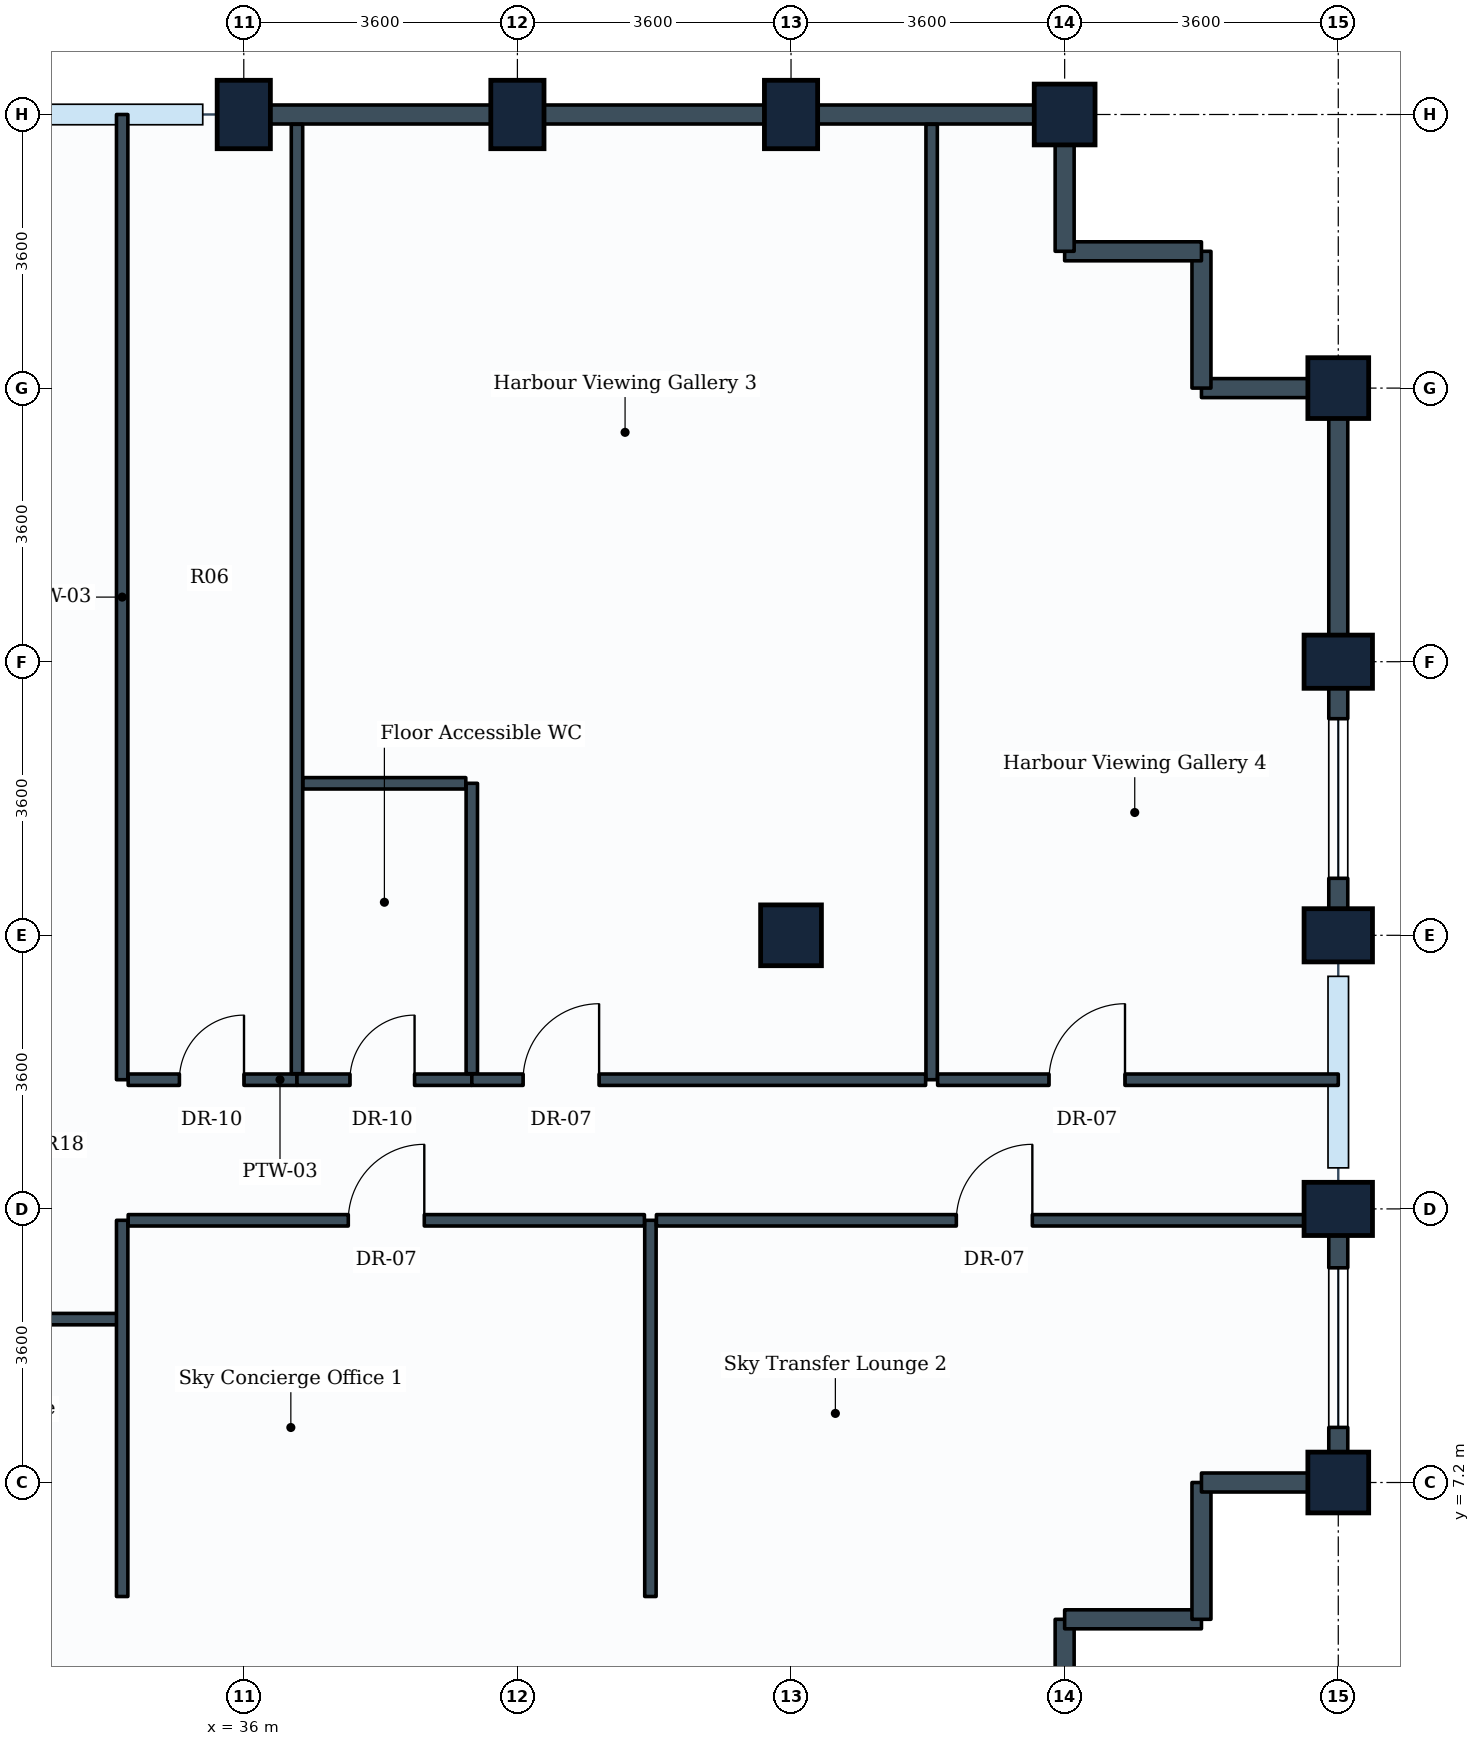
"""IFC4 building model, lengths in metres.
Left out: names, types, materials, properties, quantities, classifications, styles, units other than length and angle.
Written with IfcOpenShell. Run it as: python <this file> out.ifc"""

import sys

from ifc_helpers import new_model, si_unit, direction, frame, frame_2d, origin, origin_2d, place, context, subcontext, project, spatial, rectangle, extrude, element, fill, save


model = new_model("IFC4")
c1 = context("Model", 3, precision=1e-05, world=origin(), true_north=direction((0.0, 1.0)))
c2 = subcontext(c1, "Body", "Model", "MODEL_VIEW")
j1 = project(units=[si_unit("LENGTHUNIT", "METRE"), si_unit("PLANEANGLEUNIT", "RADIAN")], contexts=[c1])
p1 = place(None, origin())
s1 = spatial("IfcSite", under=j1, at=p1, CompositionType="ELEMENT")
p2 = place(p1, origin())
s2 = spatial("IfcBuilding", under=s1, at=p2, CompositionType="ELEMENT")
p3 = place(p2, frame((0.0, 0.0, 209.0)))
s3 = spatial("IfcBuildingStorey", under=s2, at=p3, CompositionType="ELEMENT", Elevation=209.0)
for number, where, z_axis, x_axis in (
    (1, (36.0, 25.2, 0.0), (0.0, 0.0, 1.0), (1.0, 0.0, 0.0)),
    (2, (39.6, 25.2, 0.0), (0.0, 0.0, 1.0), (1.0, 0.0, 0.0)),
):
    element("IfcColumn", number, at=place(p3, frame(where, z_axis=z_axis, x_axis=x_axis)), inside=s3, PredefinedType="COLUMN", context=c2, shape_type="SweptSolid", body=[
        extrude(rectangle(XDim=0.7, YDim=0.9, at=origin_2d()), origin(), (0.0, 0.0, 1.0), 4.8),
    ])
p4 = place(p3, frame((43.2, 14.4, 0.0), z_axis=(0.0, 0.0, 1.0), x_axis=(1.0, 0.0, 0.0)))
e3 = element("IfcColumn", 3, at=p4, inside=s3, PredefinedType="COLUMN", context=c2, shape_type="SweptSolid", body=[
    extrude(rectangle(XDim=0.8, YDim=0.8, at=origin_2d()), origin(), (0.0, 0.0, 1.0), 4.8),
])
p5 = place(p3, frame((43.2, 25.2, 0.0), z_axis=(0.0, 0.0, 1.0), x_axis=(1.0, 0.0, 0.0)))
e4 = element("IfcColumn", 4, at=p5, inside=s3, PredefinedType="COLUMN", context=c2, shape_type="SweptSolid", body=[
    extrude(rectangle(XDim=0.7, YDim=0.9, at=origin_2d()), origin(), (0.0, 0.0, 1.0), 4.8),
])
for number, where, z_axis, x_axis in (
    (5, (46.8, 25.2, 0.0), (0.0, 0.0, 1.0), (1.0, 0.0, 0.0)),
    (6, (50.4, 7.2, 0.0), (0.0, 0.0, 1.0), (1.0, 0.0, 0.0)),
):
    element("IfcColumn", number, at=place(p3, frame(where, z_axis=z_axis, x_axis=x_axis)), inside=s3, PredefinedType="COLUMN", context=c2, shape_type="SweptSolid", body=[
        extrude(rectangle(XDim=0.8, YDim=0.8, at=origin_2d()), origin(), (0.0, 0.0, 1.0), 4.8),
    ])
for number, where, z_axis, x_axis in (
    (7, (50.4, 10.8, 0.0), (0.0, 0.0, 1.0), (0.0, 1.0, 0.0)),
    (8, (50.4, 14.4, 0.0), (0.0, 0.0, 1.0), (0.0, 1.0, 0.0)),
    (9, (50.4, 18.0, 0.0), (0.0, 0.0, 1.0), (0.0, 1.0, 0.0)),
):
    element("IfcColumn", number, at=place(p3, frame(where, z_axis=z_axis, x_axis=x_axis)), inside=s3, PredefinedType="COLUMN", context=c2, shape_type="SweptSolid", body=[
        extrude(rectangle(XDim=0.7, YDim=0.9, at=origin_2d()), origin(), (0.0, 0.0, 1.0), 4.8),
    ])
p6 = place(p3, frame((50.4, 21.6, 0.0), z_axis=(0.0, 0.0, 1.0), x_axis=(0.0, 1.0, 0.0)))
e10 = element("IfcColumn", 10, at=p6, inside=s3, PredefinedType="COLUMN", context=c2, shape_type="SweptSolid", body=[
    extrude(rectangle(XDim=0.8, YDim=0.8, at=origin_2d()), origin(), (0.0, 0.0, 1.0), 4.8),
])
p7 = place(p3, frame((46.8, 5.4, 0.0), z_axis=(0.0, 0.0, 1.0), x_axis=(0.0, -1.0, 0.0)))
e11 = element("IfcWall", 11, at=p7, inside=s3, PredefinedType="STANDARD", context=c2, shape_type="SweptSolid", body=[
    extrude(rectangle(XDim=1.8, YDim=0.25, at=frame_2d((0.9, 0.0))), origin(), (0.0, 0.0, 1.0), 3.93),
])
for number, where, z_axis, x_axis in (
    (12, (48.6, 5.4, 0.0), (0.0, 0.0, 1.0), (-1.0, 0.0, 0.0)),
    (13, (48.6, 7.2, 0.0), (0.0, 0.0, 1.0), (0.0, -1.0, 0.0)),
):
    element("IfcWall", number, at=place(p3, frame(where, z_axis=z_axis, x_axis=x_axis)), inside=s3, PredefinedType="STANDARD", context=c2, shape_type="SweptSolid", body=[
        extrude(rectangle(XDim=1.8, YDim=0.25, at=frame_2d((0.9, 0.0))), origin(), (0.0, 0.0, 1.0), 4.535),
    ])
p8 = place(p3, frame((50.4, 7.2, 0.0), z_axis=(0.0, 0.0, 1.0), x_axis=(-1.0, 0.0, 0.0)))
e14 = element("IfcWall", 14, at=p8, inside=s3, PredefinedType="STANDARD", context=c2, shape_type="SweptSolid", body=[
    extrude(rectangle(XDim=1.8, YDim=0.25, at=frame_2d((0.9, 0.0))), origin(), (0.0, 0.0, 1.0), 3.93),
])
p9 = place(p3, frame((50.4, 10.8, 0.0), z_axis=(0.0, 0.0, 1.0), x_axis=(0.0, -1.0, 0.0)))
e15 = element("IfcWall", 15, at=p9, inside=s3, PredefinedType="STANDARD", context=c2, shape_type="SweptSolid", body=[
    extrude(rectangle(XDim=3.6, YDim=0.25, at=frame_2d((1.8, 0.0))), origin(), (0.0, 0.0, 1.0), 3.93),
])
p10 = place(p9, frame((0.775, 0.0, 0.85)))
e16 = element("IfcOpeningElement", 16, at=p10, cuts=e15, PredefinedType="OPENING", context=c2, shape_type="SweptSolid", body=[
    extrude(rectangle(XDim=2.1, YDim=1.35, at=frame_2d((1.05, 0.675))), frame((0.0, 0.135, 0.0), z_axis=(0.0, -1.0, 0.0), x_axis=(1.0, 0.0, 0.0)), (0.0, 0.0, 1.0), 0.27),
])
p11 = place(p3, frame((50.4, 18.0, 0.0), z_axis=(0.0, 0.0, 1.0), x_axis=(0.0, -1.0, 0.0)))
e17 = element("IfcWall", 17, at=p11, inside=s3, PredefinedType="STANDARD", context=c2, shape_type="SweptSolid", body=[
    extrude(rectangle(XDim=3.6, YDim=0.25, at=frame_2d((1.8, 0.0))), origin(), (0.0, 0.0, 1.0), 3.93),
])
p12 = place(p11, frame((0.75, 0.0, 0.85)))
e18 = element("IfcOpeningElement", 18, at=p12, cuts=e17, PredefinedType="OPENING", context=c2, shape_type="SweptSolid", body=[
    extrude(rectangle(XDim=2.1, YDim=1.35, at=frame_2d((1.05, 0.675))), frame((0.0, 0.135, 0.0), z_axis=(0.0, -1.0, 0.0), x_axis=(1.0, 0.0, 0.0)), (0.0, 0.0, 1.0), 0.27),
])
p13 = place(p3, frame((50.4, 21.6, 0.0), z_axis=(0.0, 0.0, 1.0), x_axis=(0.0, -1.0, 0.0)))
e19 = element("IfcWall", 19, at=p13, inside=s3, PredefinedType="STANDARD", context=c2, shape_type="SweptSolid", body=[
    extrude(rectangle(XDim=3.6, YDim=0.25, at=frame_2d((1.8, 0.0))), origin(), (0.0, 0.0, 1.0), 3.93),
])
p14 = place(p3, frame((48.6, 21.6, 0.0), z_axis=(0.0, 0.0, 1.0), x_axis=(1.0, 0.0, 0.0)))
e20 = element("IfcWall", 20, at=p14, inside=s3, PredefinedType="STANDARD", context=c2, shape_type="SweptSolid", body=[
    extrude(rectangle(XDim=1.8, YDim=0.25, at=frame_2d((0.9, 0.0))), origin(), (0.0, 0.0, 1.0), 3.93),
])
p15 = place(p3, frame((48.6, 23.4, 0.0), z_axis=(0.0, 0.0, 1.0), x_axis=(0.0, -1.0, 0.0)))
e21 = element("IfcWall", 21, at=p15, inside=s3, PredefinedType="STANDARD", context=c2, shape_type="SweptSolid", body=[
    extrude(rectangle(XDim=1.8, YDim=0.25, at=frame_2d((0.9, 0.0))), origin(), (0.0, 0.0, 1.0), 4.535),
])
p16 = place(p3, frame((46.8, 23.4, 0.0), z_axis=(0.0, 0.0, 1.0), x_axis=(1.0, 0.0, 0.0)))
e22 = element("IfcWall", 22, at=p16, inside=s3, PredefinedType="STANDARD", context=c2, shape_type="SweptSolid", body=[
    extrude(rectangle(XDim=1.8, YDim=0.25, at=frame_2d((0.9, 0.0))), origin(), (0.0, 0.0, 1.0), 4.535),
])
p17 = place(p3, frame((46.8, 25.2, 0.0), z_axis=(0.0, 0.0, 1.0), x_axis=(0.0, -1.0, 0.0)))
e23 = element("IfcWall", 23, at=p17, inside=s3, PredefinedType="STANDARD", context=c2, shape_type="SweptSolid", body=[
    extrude(rectangle(XDim=1.8, YDim=0.25, at=frame_2d((0.9, 0.0))), origin(), (0.0, 0.0, 1.0), 3.93),
])
p18 = place(p3, frame((43.2, 25.2, 0.0), z_axis=(0.0, 0.0, 1.0), x_axis=(1.0, 0.0, 0.0)))
e24 = element("IfcWall", 24, at=p18, inside=s3, PredefinedType="STANDARD", context=c2, shape_type="SweptSolid", body=[
    extrude(rectangle(XDim=3.6, YDim=0.25, at=frame_2d((1.8, 0.0))), origin(), (0.0, 0.0, 1.0), 3.93),
])
p19 = place(p3, frame((39.6, 25.2, 0.0), z_axis=(0.0, 0.0, 1.0), x_axis=(1.0, 0.0, 0.0)))
e25 = element("IfcWall", 25, at=p19, inside=s3, PredefinedType="STANDARD", context=c2, shape_type="SweptSolid", body=[
    extrude(rectangle(XDim=3.6, YDim=0.25, at=frame_2d((1.8, 0.0))), origin(), (0.0, 0.0, 1.0), 3.93),
])
p20 = place(p3, frame((36.0, 25.2, 0.0), z_axis=(0.0, 0.0, 1.0), x_axis=(1.0, 0.0, 0.0)))
e26 = element("IfcWall", 26, at=p20, inside=s3, PredefinedType="STANDARD", context=c2, shape_type="SweptSolid", body=[
    extrude(rectangle(XDim=3.6, YDim=0.25, at=frame_2d((1.8, 0.0))), origin(), (0.0, 0.0, 1.0), 3.93),
])
p21 = place(p3, frame((34.4, 12.5, 0.0), z_axis=(0.0, 0.0, 1.0), x_axis=(0.0, 1.0, 0.0)))
e27 = element("IfcWall", 27, at=p21, inside=s3, PredefinedType="PARTITIONING", context=c2, shape_type="SweptSolid", body=[
    extrude(rectangle(XDim=12.7, YDim=0.15, at=frame_2d((6.35, 0.0))), origin(), (0.0, 0.0, 1.0), 3.93),
])
p22 = place(p3, frame((34.479, 12.5, 0.0), z_axis=(0.0, 0.0, 1.0), x_axis=(1.0, 0.0, 0.0)))
e28 = element("IfcWall", 28, at=p22, inside=s3, PredefinedType="PARTITIONING", context=c2, shape_type="SweptSolid", body=[
    extrude(rectangle(XDim=2.221, YDim=0.15, at=frame_2d((1.11, 0.0))), origin(), (0.0, 0.0, 1.0), 4.26),
])
p23 = place(p22, frame((0.674, 0.0, 0.0)))
e29 = element("IfcOpeningElement", 29, at=p23, cuts=e28, PredefinedType="OPENING", context=c2, shape_type="SweptSolid", body=[
    extrude(rectangle(XDim=0.85, YDim=2.1, at=frame_2d((0.425, 1.05))), frame((0.0, 0.085, 0.0), z_axis=(0.0, -1.0, 0.0), x_axis=(1.0, 0.0, 0.0)), (0.0, 0.0, 1.0), 0.17),
])
p24 = place(p3, frame((36.7, 12.579, 0.0), z_axis=(0.0, 0.0, 1.0), x_axis=(0.0, 1.0, 0.0)))
e30 = element("IfcWall", 30, at=p24, inside=s3, PredefinedType="PARTITIONING", context=c2, shape_type="SweptSolid", body=[
    extrude(rectangle(XDim=12.492, YDim=0.15, at=frame_2d((6.246, 0.0))), origin(), (0.0, 0.0, 1.0), 3.93),
])
p25 = place(p3, frame((36.7, 12.5, 0.0), z_axis=(0.0, 0.0, 1.0), x_axis=(1.0, 0.0, 0.0)))
e31 = element("IfcWall", 31, at=p25, inside=s3, PredefinedType="PARTITIONING", context=c2, shape_type="SweptSolid", body=[
    extrude(rectangle(XDim=2.3, YDim=0.15, at=frame_2d((1.15, 0.0))), origin(), (0.0, 0.0, 1.0), 4.535),
])
p26 = place(p25, frame((0.697, 0.0, 0.0)))
e32 = element("IfcOpeningElement", 32, at=p26, cuts=e31, PredefinedType="OPENING", context=c2, shape_type="SweptSolid", body=[
    extrude(rectangle(XDim=0.85, YDim=2.1, at=frame_2d((0.425, 1.05))), frame((0.0, 0.085, 0.0), z_axis=(0.0, -1.0, 0.0), x_axis=(1.0, 0.0, 0.0)), (0.0, 0.0, 1.0), 0.17),
])
p27 = place(p3, frame((39.0, 12.579, 0.0), z_axis=(0.0, 0.0, 1.0), x_axis=(0.0, 1.0, 0.0)))
e33 = element("IfcWall", 33, at=p27, inside=s3, PredefinedType="PARTITIONING", context=c2, shape_type="SweptSolid", body=[
    extrude(rectangle(XDim=3.821, YDim=0.15, at=frame_2d((1.91, 0.0))), origin(), (0.0, 0.0, 1.0), 4.23),
])
p28 = place(p3, frame((36.779, 16.4, 0.0), z_axis=(0.0, 0.0, 1.0), x_axis=(1.0, 0.0, 0.0)))
e34 = element("IfcWall", 34, at=p28, inside=s3, PredefinedType="PARTITIONING", context=c2, shape_type="SweptSolid", body=[
    extrude(rectangle(XDim=2.142, YDim=0.15, at=frame_2d((1.071, 0.0))), origin(), (0.0, 0.0, 1.0), 4.535),
])
p29 = place(p3, frame((28.879, 9.35, 0.0), z_axis=(0.0, 0.0, 1.0), x_axis=(1.0, 0.0, 0.0)))
e35 = element("IfcWall", 35, at=p29, inside=s3, PredefinedType="PARTITIONING", context=c2, shape_type="SweptSolid", body=[
    extrude(rectangle(XDim=5.521, YDim=0.15, at=frame_2d((2.76, 0.0))), origin(), (0.0, 0.0, 1.0), 4.535),
])
p30 = place(p29, frame((0.36, 0.0, 0.0)))
e36 = element("IfcOpeningElement", 36, at=p30, cuts=e35, PredefinedType="OPENING", context=c2, shape_type="SweptSolid", body=[
    extrude(rectangle(XDim=1.0, YDim=2.1, at=frame_2d((0.5, 1.05))), frame((0.0, 0.085, 0.0), z_axis=(0.0, -1.0, 0.0), x_axis=(1.0, 0.0, 0.0)), (0.0, 0.0, 1.0), 0.17),
])
p31 = place(p3, frame((34.4, 5.7, 0.0), z_axis=(0.0, 0.0, 1.0), x_axis=(0.0, 1.0, 0.0)))
e37 = element("IfcWall", 37, at=p31, inside=s3, PredefinedType="PARTITIONING", context=c2, shape_type="SweptSolid", body=[
    extrude(rectangle(XDim=4.95, YDim=0.15, at=frame_2d((2.475, 0.0))), origin(), (0.0, 0.0, 1.0), 4.535),
])
p32 = place(p3, frame((41.35, 5.7, 0.0), z_axis=(0.0, 0.0, 1.0), x_axis=(0.0, 1.0, 0.0)))
e38 = element("IfcWall", 38, at=p32, inside=s3, PredefinedType="PARTITIONING", context=c2, shape_type="SweptSolid", body=[
    extrude(rectangle(XDim=4.95, YDim=0.15, at=frame_2d((2.475, 0.0))), origin(), (0.0, 0.0, 1.0), 4.2),
])
p33 = place(p3, frame((34.479, 10.65, 0.0), z_axis=(0.0, 0.0, 1.0), x_axis=(1.0, 0.0, 0.0)))
e39 = element("IfcWall", 39, at=p33, inside=s3, PredefinedType="PARTITIONING", context=c2, shape_type="SweptSolid", body=[
    extrude(rectangle(XDim=6.792, YDim=0.15, at=frame_2d((3.396, 0.0))), origin(), (0.0, 0.0, 1.0), 4.17),
])
p34 = place(p33, frame((2.896, 0.0, 0.0)))
e40 = element("IfcOpeningElement", 40, at=p34, cuts=e39, PredefinedType="OPENING", context=c2, shape_type="SweptSolid", body=[
    extrude(rectangle(XDim=1.0, YDim=2.1, at=frame_2d((0.5, 1.05))), frame((0.0, 0.085, 0.0), z_axis=(0.0, -1.0, 0.0), x_axis=(1.0, 0.0, 0.0)), (0.0, 0.0, 1.0), 0.17),
])
p35 = place(p3, frame((41.429, 10.65, 0.0), z_axis=(0.0, 0.0, 1.0), x_axis=(1.0, 0.0, 0.0)))
e41 = element("IfcWall", 41, at=p35, inside=s3, PredefinedType="PARTITIONING", context=c2, shape_type="SweptSolid", body=[
    extrude(rectangle(XDim=8.842, YDim=0.15, at=frame_2d((4.421, 0.0))), origin(), (0.0, 0.0, 1.0), 3.93),
])
p36 = place(p35, frame((3.946, 0.0, 0.0)))
e42 = element("IfcOpeningElement", 42, at=p36, cuts=e41, PredefinedType="OPENING", context=c2, shape_type="SweptSolid", body=[
    extrude(rectangle(XDim=1.0, YDim=2.1, at=frame_2d((0.5, 1.05))), frame((0.0, 0.085, 0.0), z_axis=(0.0, -1.0, 0.0), x_axis=(1.0, 0.0, 0.0)), (0.0, 0.0, 1.0), 0.17),
])
p37 = place(p3, frame((45.05, 12.5, 0.0), z_axis=(0.0, 0.0, 1.0), x_axis=(0.0, 1.0, 0.0)))
e43 = element("IfcWall", 43, at=p37, inside=s3, PredefinedType="PARTITIONING", context=c2, shape_type="SweptSolid", body=[
    extrude(rectangle(XDim=12.571, YDim=0.15, at=frame_2d((6.286, 0.0))), origin(), (0.0, 0.0, 1.0), 3.93),
])
p38 = place(p3, frame((39.0, 12.5, 0.0), z_axis=(0.0, 0.0, 1.0), x_axis=(1.0, 0.0, 0.0)))
e44 = element("IfcWall", 44, at=p38, inside=s3, PredefinedType="PARTITIONING", context=c2, shape_type="SweptSolid", body=[
    extrude(rectangle(XDim=5.971, YDim=0.15, at=frame_2d((2.985, 0.0))), origin(), (0.0, 0.0, 1.0), 4.22),
])
p39 = place(p38, frame((0.675, 0.0, 0.0)))
e45 = element("IfcOpeningElement", 45, at=p39, cuts=e44, PredefinedType="OPENING", context=c2, shape_type="SweptSolid", body=[
    extrude(rectangle(XDim=1.0, YDim=2.1, at=frame_2d((0.5, 1.05))), frame((0.0, 0.085, 0.0), z_axis=(0.0, -1.0, 0.0), x_axis=(1.0, 0.0, 0.0)), (0.0, 0.0, 1.0), 0.17),
])
p40 = place(p3, frame((45.129, 12.5, 0.0), z_axis=(0.0, 0.0, 1.0), x_axis=(1.0, 0.0, 0.0)))
e46 = element("IfcWall", 46, at=p40, inside=s3, PredefinedType="PARTITIONING", context=c2, shape_type="SweptSolid", body=[
    extrude(rectangle(XDim=5.271, YDim=0.15, at=frame_2d((2.635, 0.0))), origin(), (0.0, 0.0, 1.0), 3.93),
])
p41 = place(p40, frame((1.465, 0.0, 0.0)))
e47 = element("IfcOpeningElement", 47, at=p41, cuts=e46, PredefinedType="OPENING", context=c2, shape_type="SweptSolid", body=[
    extrude(rectangle(XDim=1.0, YDim=2.1, at=frame_2d((0.5, 1.05))), frame((0.0, 0.085, 0.0), z_axis=(0.0, -1.0, 0.0), x_axis=(1.0, 0.0, 0.0)), (0.0, 0.0, 1.0), 0.17),
])
p42 = place(p10, origin())
e48 = element("IfcWindow", 48, at=p42, inside=s3, PartitioningType="SINGLE_PANEL", PredefinedType="WINDOW", context=c2, shape_type="SweptSolid", body=[
    extrude(rectangle(XDim=2.1, YDim=1.35, at=frame_2d((1.05, 0.675))), frame((0.0, 0.03, 0.0), z_axis=(0.0, -1.0, 0.0), x_axis=(1.0, 0.0, 0.0)), (0.0, 0.0, 1.0), 0.06),
])
fill(e16, e48)
p43 = place(p12, origin())
e49 = element("IfcWindow", 49, at=p43, inside=s3, PartitioningType="SINGLE_PANEL", PredefinedType="WINDOW", context=c2, shape_type="SweptSolid", body=[
    extrude(rectangle(XDim=2.1, YDim=1.35, at=frame_2d((1.05, 0.675))), frame((0.0, 0.03, 0.0), z_axis=(0.0, -1.0, 0.0), x_axis=(1.0, 0.0, 0.0)), (0.0, 0.0, 1.0), 0.06),
])
fill(e18, e49)
p44 = place(p23, origin())
e50 = element("IfcDoor", 50, at=p44, inside=s3, OperationType="SINGLE_SWING_RIGHT", PredefinedType="DOOR", context=c2, shape_type="SweptSolid", body=[
    extrude(rectangle(XDim=0.85, YDim=2.1, at=frame_2d((0.425, 1.05))), frame((0.0, 0.025, 0.0), z_axis=(0.0, -1.0, 0.0), x_axis=(1.0, 0.0, 0.0)), (0.0, 0.0, 1.0), 0.05),
])
fill(e29, e50)
p45 = place(p26, origin())
e51 = element("IfcDoor", 51, at=p45, inside=s3, OperationType="SINGLE_SWING_RIGHT", PredefinedType="DOOR", context=c2, shape_type="SweptSolid", body=[
    extrude(rectangle(XDim=0.85, YDim=2.1, at=frame_2d((0.425, 1.05))), frame((0.0, 0.025, 0.0), z_axis=(0.0, -1.0, 0.0), x_axis=(1.0, 0.0, 0.0)), (0.0, 0.0, 1.0), 0.05),
])
fill(e32, e51)
p46 = place(p34, origin())
e52 = element("IfcDoor", 52, at=p46, inside=s3, OperationType="SINGLE_SWING_RIGHT", PredefinedType="DOOR", context=c2, shape_type="SweptSolid", body=[
    extrude(rectangle(XDim=1.0, YDim=2.1, at=frame_2d((0.5, 1.05))), frame((0.0, 0.025, 0.0), z_axis=(0.0, -1.0, 0.0), x_axis=(1.0, 0.0, 0.0)), (0.0, 0.0, 1.0), 0.05),
])
fill(e40, e52)
p47 = place(p36, origin())
e53 = element("IfcDoor", 53, at=p47, inside=s3, OperationType="SINGLE_SWING_RIGHT", PredefinedType="DOOR", context=c2, shape_type="SweptSolid", body=[
    extrude(rectangle(XDim=1.0, YDim=2.1, at=frame_2d((0.5, 1.05))), frame((0.0, 0.025, 0.0), z_axis=(0.0, -1.0, 0.0), x_axis=(1.0, 0.0, 0.0)), (0.0, 0.0, 1.0), 0.05),
])
fill(e42, e53)
p48 = place(p39, origin())
e54 = element("IfcDoor", 54, at=p48, inside=s3, OperationType="SINGLE_SWING_RIGHT", PredefinedType="DOOR", context=c2, shape_type="SweptSolid", body=[
    extrude(rectangle(XDim=1.0, YDim=2.1, at=frame_2d((0.5, 1.05))), frame((0.0, 0.025, 0.0), z_axis=(0.0, -1.0, 0.0), x_axis=(1.0, 0.0, 0.0)), (0.0, 0.0, 1.0), 0.05),
])
fill(e45, e54)
p49 = place(p41, origin())
e55 = element("IfcDoor", 55, at=p49, inside=s3, OperationType="SINGLE_SWING_RIGHT", PredefinedType="DOOR", context=c2, shape_type="SweptSolid", body=[
    extrude(rectangle(XDim=1.0, YDim=2.1, at=frame_2d((0.5, 1.05))), frame((0.0, 0.025, 0.0), z_axis=(0.0, -1.0, 0.0), x_axis=(1.0, 0.0, 0.0)), (0.0, 0.0, 1.0), 0.05),
])
fill(e47, e55)
save(model, sys.argv[1])
